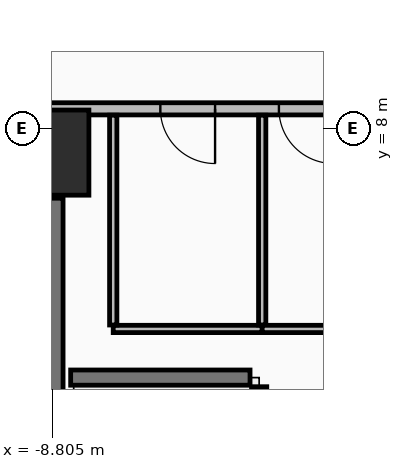
"""IFC4 building model, lengths in metres.
Left out: names, types, materials, properties, quantities, classifications, styles, units other than length and angle.
Written with IfcOpenShell. Run it as: python <this file> out.ifc"""

import sys

from ifc_helpers import new_model, si_unit, direction, frame, frame_2d, origin, origin_2d, place, context, subcontext, project, spatial, rectangle, extrude, element, fill, save


model = new_model("IFC4")
c1 = context("Model", 3, precision=1e-05, world=origin(), true_north=direction((0.0, 1.0)))
c2 = subcontext(c1, "Body", "Model", "MODEL_VIEW")
j1 = project(units=[si_unit("LENGTHUNIT", "METRE"), si_unit("PLANEANGLEUNIT", "RADIAN")], contexts=[c1])
p1 = place(None, origin())
s1 = spatial("IfcSite", under=j1, at=p1, CompositionType="ELEMENT")
p2 = place(p1, origin())
s2 = spatial("IfcBuilding", under=s1, at=p2, CompositionType="ELEMENT")
p3 = place(p2, frame((0.0, 0.0, 70.75)))
s3 = spatial("IfcBuildingStorey", under=s2, at=p3, CompositionType="ELEMENT", Elevation=70.75)
p4 = place(p3, frame((-8.9, 7.6, 0.0), z_axis=(0.0, 0.0, 1.0), x_axis=(1.0, 0.0, 0.0)))
e1 = element("IfcColumn", 1, at=p4, inside=s3, PredefinedType="COLUMN", context=c2, shape_type="SweptSolid", body=[
    extrude(rectangle(XDim=1.4, YDim=1.4, at=origin_2d()), origin(), (0.0, 0.0, 1.0), 3.45),
])
p5 = place(p3, frame((-8.9, -3.85, 0.0), z_axis=(0.0, 0.0, 1.0), x_axis=(0.0, 1.0, 0.0)))
e2 = element("IfcWall", 2, at=p5, inside=s3, PredefinedType="SHEAR", context=c2, shape_type="SweptSolid", body=[
    extrude(rectangle(XDim=10.7, YDim=0.55, at=frame_2d((5.35, 0.0))), origin(), (0.0, 0.0, 1.0), 3.275),
])
p6 = place(p3, frame((9.62, 8.32, 0.0), z_axis=(0.0, 0.0, 1.0), x_axis=(-1.0, 0.0, 0.0)))
e3 = element("IfcWall", 3, at=p6, inside=s3, PredefinedType="PARTITIONING", context=c2, shape_type="SweptSolid", body=[
    extrude(rectangle(XDim=19.24, YDim=0.2, at=frame_2d((9.62, 0.0))), origin(), (0.0, 0.0, 1.0), 2.62),
])
p7 = place(p6, frame((15.745, 0.0, 0.0)))
e4 = element("IfcOpeningElement", 4, at=p7, cuts=e3, PredefinedType="OPENING", context=c2, shape_type="SweptSolid", body=[
    extrude(rectangle(XDim=0.9, YDim=2.1, at=frame_2d((0.45, 1.05))), frame((0.0, 0.11, 0.0), z_axis=(0.0, -1.0, 0.0), x_axis=(1.0, 0.0, 0.0)), (0.0, 0.0, 1.0), 0.22),
])
p8 = place(p6, frame((13.795, 0.0, 0.0)))
e5 = element("IfcOpeningElement", 5, at=p8, cuts=e3, PredefinedType="OPENING", context=c2, shape_type="SweptSolid", body=[
    extrude(rectangle(XDim=0.9, YDim=2.1, at=frame_2d((0.45, 1.05))), frame((0.0, 0.11, 0.0), z_axis=(0.0, -1.0, 0.0), x_axis=(1.0, 0.0, 0.0)), (0.0, 0.0, 1.0), 0.22),
])
p9 = place(p3, frame((-5.4, -3.55, 0.0), z_axis=(0.0, 0.0, 1.0), x_axis=(0.0, 1.0, 0.0)))
e6 = element("IfcWall", 6, at=p9, inside=s3, PredefinedType="SHEAR", context=c2, shape_type="SweptSolid", body=[
    extrude(rectangle(XDim=7.3, YDim=0.25, at=frame_2d((3.65, 0.0))), origin(), (0.0, 0.0, 1.0), 3.275),
])
p10 = place(p3, frame((-8.5, 3.9, 0.0), z_axis=(0.0, 0.0, 1.0), x_axis=(1.0, 0.0, 0.0)))
e7 = element("IfcWall", 7, at=p10, inside=s3, PredefinedType="SHEAR", context=c2, shape_type="SweptSolid", body=[
    extrude(rectangle(XDim=2.95, YDim=0.25, at=frame_2d((1.475, 0.0))), origin(), (0.0, 0.0, 1.0), 3.275),
])
p11 = place(p3, frame((-7.8, 4.7, 0.0), z_axis=(0.0, 0.0, 1.0), x_axis=(1.0, 0.0, 0.0)))
e8 = element("IfcWall", 8, at=p11, inside=s3, PredefinedType="PARTITIONING", context=c2, shape_type="SweptSolid", body=[
    extrude(rectangle(XDim=2.45, YDim=0.12, at=frame_2d((1.225, 0.0))), origin(), (0.0, 0.0, 1.0), 3.275),
])
for number, where, z_axis, x_axis in (
    (9, (-5.35, 4.765, 0.0), (0.0, 0.0, 1.0), (0.0, 1.0, 0.0)),
    (10, (-7.8, 8.215, 0.0), (0.0, 0.0, 1.0), (0.0, -1.0, 0.0)),
):
    element("IfcWall", number, at=place(p3, frame(where, z_axis=z_axis, x_axis=x_axis)), inside=s3, PredefinedType="PARTITIONING", context=c2, shape_type="SweptSolid", body=[
        extrude(rectangle(XDim=3.45, YDim=0.12, at=frame_2d((1.725, 0.0))), origin(), (0.0, 0.0, 1.0), 2.47),
    ])
p12 = place(p3, frame((-5.35, 4.7, 0.0), z_axis=(0.0, 0.0, 1.0), x_axis=(1.0, 0.0, 0.0)))
e11 = element("IfcWall", 11, at=p12, inside=s3, PredefinedType="PARTITIONING", context=c2, shape_type="SweptSolid", body=[
    extrude(rectangle(XDim=1.45, YDim=0.12, at=frame_2d((0.725, 0.0))), origin(), (0.0, 0.0, 1.0), 3.275),
])
p13 = place(p7, origin())
e12 = element("IfcDoor", 12, at=p13, inside=s3, OperationType="SINGLE_SWING_LEFT", PredefinedType="DOOR", context=c2, shape_type="SweptSolid", body=[
    extrude(rectangle(XDim=0.9, YDim=2.1, at=frame_2d((0.45, 1.05))), frame((0.0, 0.025, 0.0), z_axis=(0.0, -1.0, 0.0), x_axis=(1.0, 0.0, 0.0)), (0.0, 0.0, 1.0), 0.05),
])
fill(e4, e12)
p14 = place(p8, origin())
e13 = element("IfcDoor", 13, at=p14, inside=s3, OperationType="SINGLE_SWING_LEFT", PredefinedType="DOOR", context=c2, shape_type="SweptSolid", body=[
    extrude(rectangle(XDim=0.9, YDim=2.1, at=frame_2d((0.45, 1.05))), frame((0.0, 0.025, 0.0), z_axis=(0.0, -1.0, 0.0), x_axis=(1.0, 0.0, 0.0)), (0.0, 0.0, 1.0), 0.05),
])
fill(e5, e13)
save(model, sys.argv[1])
